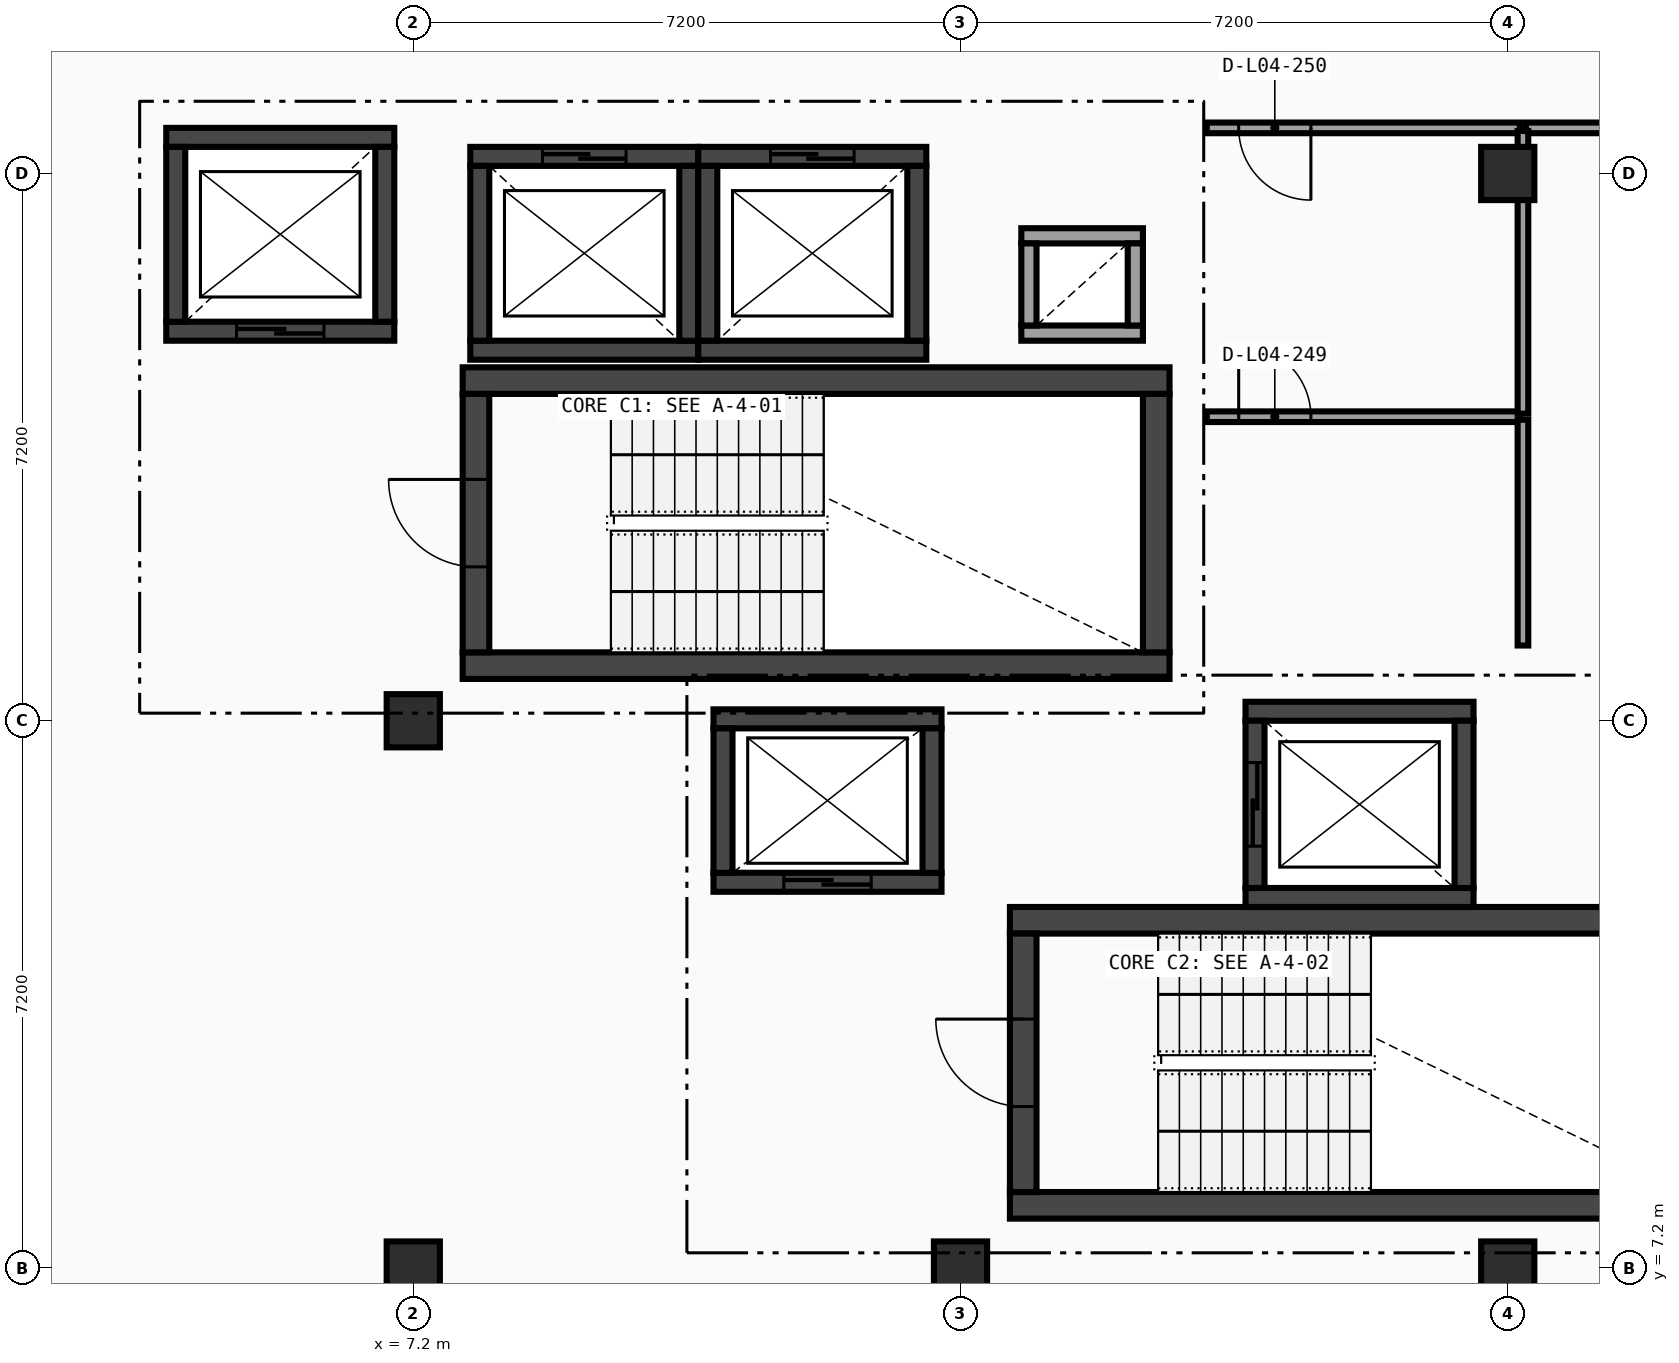
"""IFC4 building model, lengths in metres.
Left out: names, types, materials, properties, quantities, classifications, styles, units other than length and angle.
Written with IfcOpenShell. Run it as: python <this file> out.ifc"""

import sys

from ifc_helpers import new_model, si_unit, direction, frame, frame_2d, origin, origin_2d, place, context, subcontext, project, spatial, rectangle, extrude, element, fill, save


model = new_model("IFC4")
c1 = context("Model", 3, precision=1e-05, world=origin(), true_north=direction((0.0, 1.0)))
c2 = subcontext(c1, "Body", "Model", "MODEL_VIEW")
j1 = project(units=[si_unit("LENGTHUNIT", "METRE"), si_unit("PLANEANGLEUNIT", "RADIAN")], contexts=[c1])
p1 = place(None, origin())
s1 = spatial("IfcSite", under=j1, at=p1, CompositionType="ELEMENT")
p2 = place(p1, origin())
s2 = spatial("IfcBuilding", under=s1, at=p2, CompositionType="ELEMENT")
p3 = place(p2, frame((0.0, 0.0, 18.9)))
s3 = spatial("IfcBuildingStorey", under=s2, at=p3, CompositionType="ELEMENT", Elevation=18.9)
for number, where, z_axis, x_axis in (
    (1, (7.2, 7.2, 0.0), (0.0, 0.0, 1.0), (1.0, 0.0, 0.0)),
    (2, (7.2, 14.4, 0.0), (0.0, 0.0, 1.0), (1.0, 0.0, 0.0)),
    (3, (14.4, 7.2, 0.0), (0.0, 0.0, 1.0), (1.0, 0.0, 0.0)),
    (4, (21.6, 7.2, 0.0), (0.0, 0.0, 1.0), (1.0, 0.0, 0.0)),
    (5, (21.6, 21.6, 0.0), (0.0, 0.0, 1.0), (1.0, 0.0, 0.0)),
):
    element("IfcColumn", number, at=place(p3, frame(where, z_axis=z_axis, x_axis=x_axis)), inside=s3, PredefinedType="COLUMN", context=c2, shape_type="SweptSolid", body=[
        extrude(rectangle(XDim=0.7, YDim=0.7, at=origin_2d()), origin(), (0.0, 0.0, 1.0), 4.05),
    ])
for number, where, z_axis, x_axis in (
    (6, (7.85, 15.125, 0.0), (0.0, 0.0, 1.0), (1.0, 0.0, 0.0)),
    (7, (17.15, 18.875, 0.0), (0.0, 0.0, 1.0), (-1.0, 0.0, 0.0)),
):
    element("IfcWall", number, at=place(p3, frame(where, z_axis=z_axis, x_axis=x_axis)), inside=s3, PredefinedType="SHEAR", context=c2, shape_type="SweptSolid", body=[
        extrude(rectangle(XDim=9.3, YDim=0.35, at=frame_2d((4.65, 0.0))), origin(), (0.0, 0.0, 1.0), 3.8),
    ])
p4 = place(p3, frame((8.025, 18.7, 0.0), z_axis=(0.0, 0.0, 1.0), x_axis=(0.0, -1.0, 0.0)))
e8 = element("IfcWall", 8, at=p4, inside=s3, PredefinedType="SHEAR", context=c2, shape_type="SweptSolid", body=[
    extrude(rectangle(XDim=3.4, YDim=0.35, at=frame_2d((1.7, 0.0))), origin(), (0.0, 0.0, 1.0), 3.8),
])
p5 = place(p4, frame((1.125, 0.0, 0.0)))
e9 = element("IfcOpeningElement", 9, at=p5, cuts=e8, PredefinedType="OPENING", context=c2, shape_type="SweptSolid", body=[
    extrude(rectangle(XDim=1.15, YDim=2.1, at=frame_2d((0.575, 1.05))), frame((0.0, 0.185, 0.0), z_axis=(0.0, -1.0, 0.0), x_axis=(1.0, 0.0, 0.0)), (0.0, 0.0, 1.0), 0.37),
])
p6 = place(p3, frame((16.975, 15.3, 0.0), z_axis=(0.0, 0.0, 1.0), x_axis=(0.0, 1.0, 0.0)))
e10 = element("IfcWall", 10, at=p6, inside=s3, PredefinedType="SHEAR", context=c2, shape_type="SweptSolid", body=[
    extrude(rectangle(XDim=3.4, YDim=0.35, at=frame_2d((1.7, 0.0))), origin(), (0.0, 0.0, 1.0), 3.8),
])
p7 = place(p3, frame((3.95, 19.525, 0.0), z_axis=(0.0, 0.0, 1.0), x_axis=(1.0, 0.0, 0.0)))
e11 = element("IfcWall", 11, at=p7, inside=s3, PredefinedType="SHEAR", context=c2, shape_type="SweptSolid", body=[
    extrude(rectangle(XDim=3.0, YDim=0.25, at=frame_2d((1.5, 0.0))), origin(), (0.0, 0.0, 1.0), 3.8),
])
p8 = place(p7, frame((0.925, 0.0, 0.0)))
e12 = element("IfcOpeningElement", 12, at=p8, cuts=e11, PredefinedType="OPENING", context=c2, shape_type="SweptSolid", body=[
    extrude(rectangle(XDim=1.15, YDim=2.1, at=frame_2d((0.575, 1.05))), frame((0.0, 0.135, 0.0), z_axis=(0.0, -1.0, 0.0), x_axis=(1.0, 0.0, 0.0)), (0.0, 0.0, 1.0), 0.27),
])
p9 = place(p3, frame((6.95, 22.075, 0.0), z_axis=(0.0, 0.0, 1.0), x_axis=(-1.0, 0.0, 0.0)))
e13 = element("IfcWall", 13, at=p9, inside=s3, PredefinedType="SHEAR", context=c2, shape_type="SweptSolid", body=[
    extrude(rectangle(XDim=3.0, YDim=0.25, at=frame_2d((1.5, 0.0))), origin(), (0.0, 0.0, 1.0), 3.8),
])
for number, where, z_axis, x_axis in (
    (14, (4.075, 21.95, 0.0), (0.0, 0.0, 1.0), (0.0, -1.0, 0.0)),
    (15, (6.825, 19.65, 0.0), (0.0, 0.0, 1.0), (0.0, 1.0, 0.0)),
):
    element("IfcWall", number, at=place(p3, frame(where, z_axis=z_axis, x_axis=x_axis)), inside=s3, PredefinedType="SHEAR", context=c2, shape_type="SweptSolid", body=[
        extrude(rectangle(XDim=2.3, YDim=0.25, at=frame_2d((1.15, 0.0))), origin(), (0.0, 0.0, 1.0), 3.8),
    ])
p10 = place(p3, frame((7.95, 19.275, 0.0), z_axis=(0.0, 0.0, 1.0), x_axis=(1.0, 0.0, 0.0)))
e16 = element("IfcWall", 16, at=p10, inside=s3, PredefinedType="SHEAR", context=c2, shape_type="SweptSolid", body=[
    extrude(rectangle(XDim=3.0, YDim=0.25, at=frame_2d((1.5, 0.0))), origin(), (0.0, 0.0, 1.0), 3.8),
])
p11 = place(p3, frame((10.95, 21.825, 0.0), z_axis=(0.0, 0.0, 1.0), x_axis=(-1.0, 0.0, 0.0)))
e17 = element("IfcWall", 17, at=p11, inside=s3, PredefinedType="SHEAR", context=c2, shape_type="SweptSolid", body=[
    extrude(rectangle(XDim=3.0, YDim=0.25, at=frame_2d((1.5, 0.0))), origin(), (0.0, 0.0, 1.0), 3.8),
])
p12 = place(p11, frame((0.95, 0.0, 0.0)))
e18 = element("IfcOpeningElement", 18, at=p12, cuts=e17, PredefinedType="OPENING", context=c2, shape_type="SweptSolid", body=[
    extrude(rectangle(XDim=1.1, YDim=2.1, at=frame_2d((0.55, 1.05))), frame((0.0, 0.135, 0.0), z_axis=(0.0, -1.0, 0.0), x_axis=(1.0, 0.0, 0.0)), (0.0, 0.0, 1.0), 0.27),
])
for number, where, z_axis, x_axis in (
    (19, (8.075, 21.7, 0.0), (0.0, 0.0, 1.0), (0.0, -1.0, 0.0)),
    (20, (10.825, 19.4, 0.0), (0.0, 0.0, 1.0), (0.0, 1.0, 0.0)),
):
    element("IfcWall", number, at=place(p3, frame(where, z_axis=z_axis, x_axis=x_axis)), inside=s3, PredefinedType="SHEAR", context=c2, shape_type="SweptSolid", body=[
        extrude(rectangle(XDim=2.3, YDim=0.25, at=frame_2d((1.15, 0.0))), origin(), (0.0, 0.0, 1.0), 3.8),
    ])
p13 = place(p3, frame((10.95, 19.275, 0.0), z_axis=(0.0, 0.0, 1.0), x_axis=(1.0, 0.0, 0.0)))
e21 = element("IfcWall", 21, at=p13, inside=s3, PredefinedType="SHEAR", context=c2, shape_type="SweptSolid", body=[
    extrude(rectangle(XDim=3.0, YDim=0.25, at=frame_2d((1.5, 0.0))), origin(), (0.0, 0.0, 1.0), 3.8),
])
p14 = place(p3, frame((13.95, 21.825, 0.0), z_axis=(0.0, 0.0, 1.0), x_axis=(-1.0, 0.0, 0.0)))
e22 = element("IfcWall", 22, at=p14, inside=s3, PredefinedType="SHEAR", context=c2, shape_type="SweptSolid", body=[
    extrude(rectangle(XDim=3.0, YDim=0.25, at=frame_2d((1.5, 0.0))), origin(), (0.0, 0.0, 1.0), 3.8),
])
p15 = place(p14, frame((0.95, 0.0, 0.0)))
e23 = element("IfcOpeningElement", 23, at=p15, cuts=e22, PredefinedType="OPENING", context=c2, shape_type="SweptSolid", body=[
    extrude(rectangle(XDim=1.1, YDim=2.1, at=frame_2d((0.55, 1.05))), frame((0.0, 0.135, 0.0), z_axis=(0.0, -1.0, 0.0), x_axis=(1.0, 0.0, 0.0)), (0.0, 0.0, 1.0), 0.27),
])
for number, where, z_axis, x_axis in (
    (24, (11.075, 21.7, 0.0), (0.0, 0.0, 1.0), (0.0, -1.0, 0.0)),
    (25, (13.825, 19.4, 0.0), (0.0, 0.0, 1.0), (0.0, 1.0, 0.0)),
):
    element("IfcWall", number, at=place(p3, frame(where, z_axis=z_axis, x_axis=x_axis)), inside=s3, PredefinedType="SHEAR", context=c2, shape_type="SweptSolid", body=[
        extrude(rectangle(XDim=2.3, YDim=0.25, at=frame_2d((1.15, 0.0))), origin(), (0.0, 0.0, 1.0), 3.8),
    ])
for number, where, z_axis, x_axis in (
    (26, (15.05, 8.025, 0.0), (0.0, 0.0, 1.0), (1.0, 0.0, 0.0)),
    (27, (24.35, 11.775, 0.0), (0.0, 0.0, 1.0), (-1.0, 0.0, 0.0)),
):
    element("IfcWall", number, at=place(p3, frame(where, z_axis=z_axis, x_axis=x_axis)), inside=s3, PredefinedType="SHEAR", context=c2, shape_type="SweptSolid", body=[
        extrude(rectangle(XDim=9.3, YDim=0.35, at=frame_2d((4.65, 0.0))), origin(), (0.0, 0.0, 1.0), 3.8),
    ])
p16 = place(p3, frame((15.225, 11.6, 0.0), z_axis=(0.0, 0.0, 1.0), x_axis=(0.0, -1.0, 0.0)))
e28 = element("IfcWall", 28, at=p16, inside=s3, PredefinedType="SHEAR", context=c2, shape_type="SweptSolid", body=[
    extrude(rectangle(XDim=3.4, YDim=0.35, at=frame_2d((1.7, 0.0))), origin(), (0.0, 0.0, 1.0), 3.8),
])
p17 = place(p16, frame((1.125, 0.0, 0.0)))
e29 = element("IfcOpeningElement", 29, at=p17, cuts=e28, PredefinedType="OPENING", context=c2, shape_type="SweptSolid", body=[
    extrude(rectangle(XDim=1.15, YDim=2.1, at=frame_2d((0.575, 1.05))), frame((0.0, 0.185, 0.0), z_axis=(0.0, -1.0, 0.0), x_axis=(1.0, 0.0, 0.0)), (0.0, 0.0, 1.0), 0.37),
])
p18 = place(p3, frame((11.15, 12.275, 0.0), z_axis=(0.0, 0.0, 1.0), x_axis=(1.0, 0.0, 0.0)))
e30 = element("IfcWall", 30, at=p18, inside=s3, PredefinedType="SHEAR", context=c2, shape_type="SweptSolid", body=[
    extrude(rectangle(XDim=3.0, YDim=0.25, at=frame_2d((1.5, 0.0))), origin(), (0.0, 0.0, 1.0), 3.8),
])
p19 = place(p18, frame((0.925, 0.0, 0.0)))
e31 = element("IfcOpeningElement", 31, at=p19, cuts=e30, PredefinedType="OPENING", context=c2, shape_type="SweptSolid", body=[
    extrude(rectangle(XDim=1.15, YDim=2.1, at=frame_2d((0.575, 1.05))), frame((0.0, 0.135, 0.0), z_axis=(0.0, -1.0, 0.0), x_axis=(1.0, 0.0, 0.0)), (0.0, 0.0, 1.0), 0.27),
])
p20 = place(p3, frame((14.15, 14.425, 0.0), z_axis=(0.0, 0.0, 1.0), x_axis=(-1.0, 0.0, 0.0)))
e32 = element("IfcWall", 32, at=p20, inside=s3, PredefinedType="SHEAR", context=c2, shape_type="SweptSolid", body=[
    extrude(rectangle(XDim=3.0, YDim=0.25, at=frame_2d((1.5, 0.0))), origin(), (0.0, 0.0, 1.0), 3.8),
])
for number, where, z_axis, x_axis in (
    (33, (11.275, 14.3, 0.0), (0.0, 0.0, 1.0), (0.0, -1.0, 0.0)),
    (34, (14.025, 12.4, 0.0), (0.0, 0.0, 1.0), (0.0, 1.0, 0.0)),
):
    element("IfcWall", number, at=place(p3, frame(where, z_axis=z_axis, x_axis=x_axis)), inside=s3, PredefinedType="SHEAR", context=c2, shape_type="SweptSolid", body=[
        extrude(rectangle(XDim=1.9, YDim=0.25, at=frame_2d((0.95, 0.0))), origin(), (0.0, 0.0, 1.0), 3.8),
    ])
for number, where, z_axis, x_axis in (
    (35, (18.15, 12.075, 0.0), (0.0, 0.0, 1.0), (1.0, 0.0, 0.0)),
    (36, (21.15, 14.525, 0.0), (0.0, 0.0, 1.0), (-1.0, 0.0, 0.0)),
):
    element("IfcWall", number, at=place(p3, frame(where, z_axis=z_axis, x_axis=x_axis)), inside=s3, PredefinedType="SHEAR", context=c2, shape_type="SweptSolid", body=[
        extrude(rectangle(XDim=3.0, YDim=0.25, at=frame_2d((1.5, 0.0))), origin(), (0.0, 0.0, 1.0), 3.8),
    ])
p21 = place(p3, frame((18.275, 14.4, 0.0), z_axis=(0.0, 0.0, 1.0), x_axis=(0.0, -1.0, 0.0)))
e37 = element("IfcWall", 37, at=p21, inside=s3, PredefinedType="SHEAR", context=c2, shape_type="SweptSolid", body=[
    extrude(rectangle(XDim=2.2, YDim=0.25, at=frame_2d((1.1, 0.0))), origin(), (0.0, 0.0, 1.0), 3.8),
])
p22 = place(p21, frame((0.55, 0.0, 0.0)))
e38 = element("IfcOpeningElement", 38, at=p22, cuts=e37, PredefinedType="OPENING", context=c2, shape_type="SweptSolid", body=[
    extrude(rectangle(XDim=1.1, YDim=2.1, at=frame_2d((0.55, 1.05))), frame((0.0, 0.135, 0.0), z_axis=(0.0, -1.0, 0.0), x_axis=(1.0, 0.0, 0.0)), (0.0, 0.0, 1.0), 0.27),
])
p23 = place(p3, frame((21.025, 12.2, 0.0), z_axis=(0.0, 0.0, 1.0), x_axis=(0.0, 1.0, 0.0)))
e39 = element("IfcWall", 39, at=p23, inside=s3, PredefinedType="SHEAR", context=c2, shape_type="SweptSolid", body=[
    extrude(rectangle(XDim=2.2, YDim=0.25, at=frame_2d((1.1, 0.0))), origin(), (0.0, 0.0, 1.0), 3.8),
])
for number, where, z_axis, x_axis in (
    (40, (15.2, 19.5, 0.0), (0.0, 0.0, 1.0), (1.0, 0.0, 0.0)),
    (41, (16.8, 20.78, 0.0), (0.0, 0.0, 1.0), (-1.0, 0.0, 0.0)),
):
    element("IfcWall", number, at=place(p3, frame(where, z_axis=z_axis, x_axis=x_axis)), inside=s3, PredefinedType="SOLIDWALL", context=c2, shape_type="SweptSolid", body=[
        extrude(rectangle(XDim=1.6, YDim=0.2, at=frame_2d((0.8, 0.0))), origin(), (0.0, 0.0, 1.0), 3.8),
    ])
for number, where, z_axis, x_axis in (
    (42, (15.3, 20.68, 0.0), (0.0, 0.0, 1.0), (0.0, -1.0, 0.0)),
    (43, (16.7, 19.6, 0.0), (0.0, 0.0, 1.0), (0.0, 1.0, 0.0)),
):
    element("IfcWall", number, at=place(p3, frame(where, z_axis=z_axis, x_axis=x_axis)), inside=s3, PredefinedType="SOLIDWALL", context=c2, shape_type="SweptSolid", body=[
        extrude(rectangle(XDim=1.08, YDim=0.2, at=frame_2d((0.54, 0.0))), origin(), (0.0, 0.0, 1.0), 3.8),
    ])
p24 = place(p3, frame((17.64, 22.2, 0.0), z_axis=(0.0, 0.0, 1.0), x_axis=(1.0, 0.0, 0.0)))
e44 = element("IfcWall", 44, at=p24, inside=s3, PredefinedType="PARTITIONING", context=c2, shape_type="SweptSolid", body=[
    extrude(rectangle(XDim=4.12, YDim=0.14, at=frame_2d((2.06, 0.0))), origin(), (0.0, 0.0, 1.0), 3.206),
])
p25 = place(p24, frame((0.42, 0.0, 0.0)))
e45 = element("IfcOpeningElement", 45, at=p25, cuts=e44, PredefinedType="OPENING", context=c2, shape_type="SweptSolid", body=[
    extrude(rectangle(XDim=0.95, YDim=2.08, at=frame_2d((0.475, 1.04))), frame((0.0, 0.08, 0.0), z_axis=(0.0, -1.0, 0.0), x_axis=(1.0, 0.0, 0.0)), (0.0, 0.0, 1.0), 0.16),
])
p26 = place(p3, frame((21.84, 22.2, 0.0), z_axis=(0.0, 0.0, 1.0), x_axis=(1.0, 0.0, 0.0)))
e46 = element("IfcWall", 46, at=p26, inside=s3, PredefinedType="PARTITIONING", context=c2, shape_type="SweptSolid", body=[
    extrude(rectangle(XDim=2.92, YDim=0.14, at=frame_2d((1.46, 0.0))), origin(), (0.0, 0.0, 1.0), 3.8),
])
p27 = place(p26, frame((1.55, 0.0, 0.0)))
e47 = element("IfcOpeningElement", 47, at=p27, cuts=e46, PredefinedType="OPENING", context=c2, shape_type="SweptSolid", body=[
    extrude(rectangle(XDim=0.95, YDim=2.08, at=frame_2d((0.475, 1.04))), frame((0.0, 0.08, 0.0), z_axis=(0.0, -1.0, 0.0), x_axis=(1.0, 0.0, 0.0)), (0.0, 0.0, 1.0), 0.16),
])
p28 = place(p3, frame((17.64, 18.4, 0.0), z_axis=(0.0, 0.0, 1.0), x_axis=(1.0, 0.0, 0.0)))
e48 = element("IfcWall", 48, at=p28, inside=s3, PredefinedType="PARTITIONING", context=c2, shape_type="SweptSolid", body=[
    extrude(rectangle(XDim=4.12, YDim=0.14, at=frame_2d((2.06, 0.0))), origin(), (0.0, 0.0, 1.0), 3.8),
])
p29 = place(p28, frame((0.42, 0.0, 0.0)))
e49 = element("IfcOpeningElement", 49, at=p29, cuts=e48, PredefinedType="OPENING", context=c2, shape_type="SweptSolid", body=[
    extrude(rectangle(XDim=0.95, YDim=2.08, at=frame_2d((0.475, 1.04))), frame((0.0, 0.08, 0.0), z_axis=(0.0, -1.0, 0.0), x_axis=(1.0, 0.0, 0.0)), (0.0, 0.0, 1.0), 0.16),
])
p30 = place(p3, frame((21.8, 15.39, 0.0), z_axis=(0.0, 0.0, 1.0), x_axis=(0.0, 1.0, 0.0)))
e50 = element("IfcWall", 50, at=p30, inside=s3, PredefinedType="PARTITIONING", context=c2, shape_type="SweptSolid", body=[
    extrude(rectangle(XDim=2.97, YDim=0.14, at=frame_2d((1.485, 0.0))), origin(), (0.0, 0.0, 1.0), 3.8),
])
p31 = place(p3, frame((21.8, 18.44, 0.0), z_axis=(0.0, 0.0, 1.0), x_axis=(0.0, 1.0, 0.0)))
e51 = element("IfcWall", 51, at=p31, inside=s3, PredefinedType="PARTITIONING", context=c2, shape_type="SweptSolid", body=[
    extrude(rectangle(XDim=3.72, YDim=0.14, at=frame_2d((1.86, 0.0))), origin(), (0.0, 0.0, 1.0), 3.206),
])
p32 = place(p5, frame((1.15, 0.0, 0.0), z_axis=(0.0, 0.0, 1.0), x_axis=(-1.0, 0.0, 0.0)))
e52 = element("IfcDoor", 52, at=p32, inside=s3, OperationType="SINGLE_SWING_RIGHT", PredefinedType="DOOR", context=c2, shape_type="SweptSolid", body=[
    extrude(rectangle(XDim=1.15, YDim=2.1, at=frame_2d((0.575, 1.05))), frame((0.0, 0.025, 0.0), z_axis=(0.0, -1.0, 0.0), x_axis=(1.0, 0.0, 0.0)), (0.0, 0.0, 1.0), 0.05),
])
fill(e9, e52)
p33 = place(p8, origin())
e53 = element("IfcDoor", 53, at=p33, inside=s3, OperationType="SLIDING_TO_RIGHT", PredefinedType="DOOR", context=c2, shape_type="SweptSolid", body=[
    extrude(rectangle(XDim=1.15, YDim=2.1, at=frame_2d((0.575, 1.05))), frame((0.0, 0.025, 0.0), z_axis=(0.0, -1.0, 0.0), x_axis=(1.0, 0.0, 0.0)), (0.0, 0.0, 1.0), 0.05),
])
fill(e12, e53)
p34 = place(p12, origin())
e54 = element("IfcDoor", 54, at=p34, inside=s3, OperationType="SLIDING_TO_LEFT", PredefinedType="DOOR", context=c2, shape_type="SweptSolid", body=[
    extrude(rectangle(XDim=1.1, YDim=2.1, at=frame_2d((0.55, 1.05))), frame((0.0, 0.025, 0.0), z_axis=(0.0, -1.0, 0.0), x_axis=(1.0, 0.0, 0.0)), (0.0, 0.0, 1.0), 0.05),
])
fill(e18, e54)
p35 = place(p15, origin())
e55 = element("IfcDoor", 55, at=p35, inside=s3, OperationType="SLIDING_TO_LEFT", PredefinedType="DOOR", context=c2, shape_type="SweptSolid", body=[
    extrude(rectangle(XDim=1.1, YDim=2.1, at=frame_2d((0.55, 1.05))), frame((0.0, 0.025, 0.0), z_axis=(0.0, -1.0, 0.0), x_axis=(1.0, 0.0, 0.0)), (0.0, 0.0, 1.0), 0.05),
])
fill(e23, e55)
p36 = place(p17, frame((1.15, 0.0, 0.0), z_axis=(0.0, 0.0, 1.0), x_axis=(-1.0, 0.0, 0.0)))
e56 = element("IfcDoor", 56, at=p36, inside=s3, OperationType="SINGLE_SWING_RIGHT", PredefinedType="DOOR", context=c2, shape_type="SweptSolid", body=[
    extrude(rectangle(XDim=1.15, YDim=2.1, at=frame_2d((0.575, 1.05))), frame((0.0, 0.025, 0.0), z_axis=(0.0, -1.0, 0.0), x_axis=(1.0, 0.0, 0.0)), (0.0, 0.0, 1.0), 0.05),
])
fill(e29, e56)
p37 = place(p19, origin())
e57 = element("IfcDoor", 57, at=p37, inside=s3, OperationType="SLIDING_TO_RIGHT", PredefinedType="DOOR", context=c2, shape_type="SweptSolid", body=[
    extrude(rectangle(XDim=1.15, YDim=2.1, at=frame_2d((0.575, 1.05))), frame((0.0, 0.025, 0.0), z_axis=(0.0, -1.0, 0.0), x_axis=(1.0, 0.0, 0.0)), (0.0, 0.0, 1.0), 0.05),
])
fill(e31, e57)
p38 = place(p22, origin())
e58 = element("IfcDoor", 58, at=p38, inside=s3, OperationType="SLIDING_TO_LEFT", PredefinedType="DOOR", context=c2, shape_type="SweptSolid", body=[
    extrude(rectangle(XDim=1.1, YDim=2.1, at=frame_2d((0.55, 1.05))), frame((0.0, 0.025, 0.0), z_axis=(0.0, -1.0, 0.0), x_axis=(1.0, 0.0, 0.0)), (0.0, 0.0, 1.0), 0.05),
])
fill(e38, e58)
p39 = place(p29, origin())
e59 = element("IfcDoor", 59, at=p39, inside=s3, OperationType="SINGLE_SWING_LEFT", PredefinedType="DOOR", context=c2, shape_type="SweptSolid", body=[
    extrude(rectangle(XDim=0.95, YDim=2.08, at=frame_2d((0.475, 1.04))), frame((0.0, 0.025, 0.0), z_axis=(0.0, -1.0, 0.0), x_axis=(1.0, 0.0, 0.0)), (0.0, 0.0, 1.0), 0.05),
])
fill(e49, e59)
p40 = place(p25, origin())
e60 = element("IfcDoor", 60, at=p40, inside=s3, OperationType="SINGLE_SWING_RIGHT", PredefinedType="DOOR", context=c2, shape_type="SweptSolid", body=[
    extrude(rectangle(XDim=0.95, YDim=2.08, at=frame_2d((0.475, 1.04))), frame((0.0, 0.025, 0.0), z_axis=(0.0, -1.0, 0.0), x_axis=(1.0, 0.0, 0.0)), (0.0, 0.0, 1.0), 0.05),
])
fill(e45, e60)
save(model, sys.argv[1])
